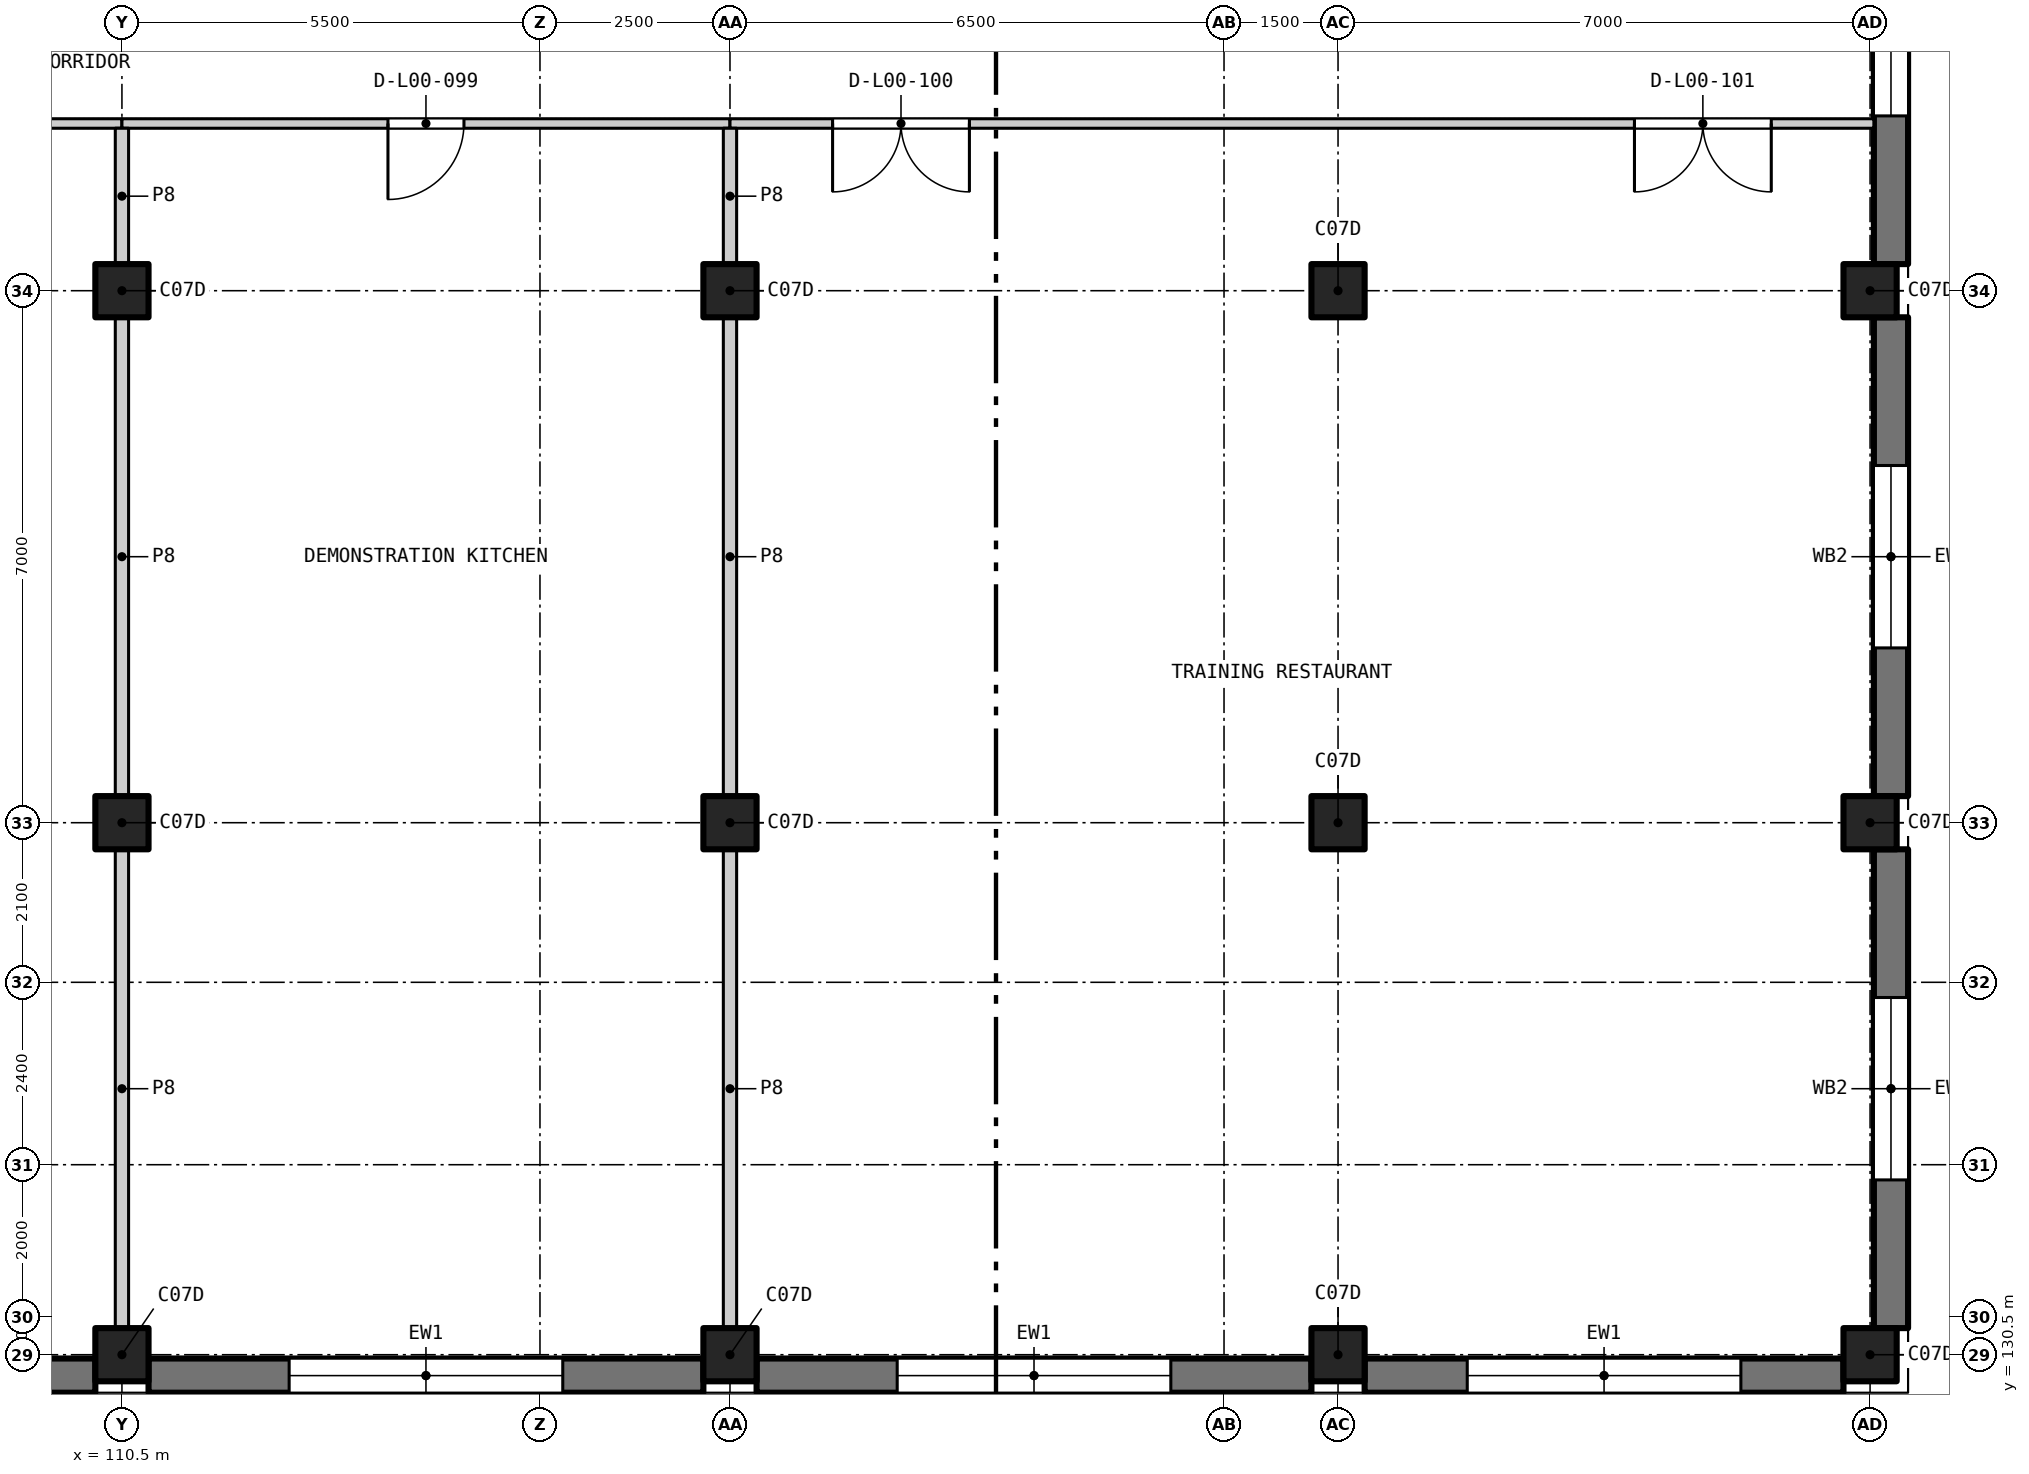
"""IFC4 building model, lengths in metres.
Left out: names, types, materials, properties, quantities, classifications, styles, units other than length and angle.
Written with IfcOpenShell. Run it as: python <this file> out.ifc"""

import sys

from ifc_helpers import new_model, si_unit, direction, frame, frame_2d, origin, origin_2d, place, context, subcontext, project, spatial, rectangle, extrude, element, fill, save


model = new_model("IFC4")
c1 = context("Model", 3, precision=1e-05, world=origin(), true_north=direction((0.0, 1.0)))
c2 = subcontext(c1, "Body", "Model", "MODEL_VIEW")
j1 = project(units=[si_unit("LENGTHUNIT", "METRE"), si_unit("PLANEANGLEUNIT", "RADIAN")], contexts=[c1])
p1 = place(None, origin())
s1 = spatial("IfcSite", under=j1, at=p1, CompositionType="ELEMENT")
p2 = place(p1, origin())
s2 = spatial("IfcBuilding", under=s1, at=p2, CompositionType="ELEMENT")
p3 = place(p2, origin())
s3 = spatial("IfcBuildingStorey", under=s2, at=p3, CompositionType="ELEMENT", Elevation=0.0)
for number, where, z_axis, x_axis in (
    (1, (110.5, 130.5, -1.4), (0.0, 0.0, 1.0), (1.0, 0.0, 0.0)),
    (2, (110.5, 137.5, -1.4), (0.0, 0.0, 1.0), (1.0, 0.0, 0.0)),
    (3, (110.5, 144.5, -1.4), (0.0, 0.0, 1.0), (1.0, 0.0, 0.0)),
    (4, (118.5, 130.5, -1.4), (0.0, 0.0, 1.0), (1.0, 0.0, 0.0)),
    (5, (118.5, 137.5, -1.4), (0.0, 0.0, 1.0), (1.0, 0.0, 0.0)),
    (6, (118.5, 144.5, -1.4), (0.0, 0.0, 1.0), (1.0, 0.0, 0.0)),
    (7, (126.5, 130.5, -1.4), (0.0, 0.0, 1.0), (1.0, 0.0, 0.0)),
    (8, (126.5, 137.5, -1.4), (0.0, 0.0, 1.0), (1.0, 0.0, 0.0)),
    (9, (126.5, 144.5, -1.4), (0.0, 0.0, 1.0), (1.0, 0.0, 0.0)),
    (10, (133.5, 130.5, -1.4), (0.0, 0.0, 1.0), (1.0, 0.0, 0.0)),
    (11, (133.5, 137.5, -1.4), (0.0, 0.0, 1.0), (1.0, 0.0, 0.0)),
    (12, (133.5, 144.5, -1.4), (0.0, 0.0, 1.0), (1.0, 0.0, 0.0)),
):
    element("IfcColumn", number, at=place(p3, frame(where, z_axis=z_axis, x_axis=x_axis)), inside=s3, PredefinedType="COLUMN", context=c2, shape_type="SweptSolid", body=[
        extrude(rectangle(XDim=0.7, YDim=0.7, at=origin_2d()), origin(), (0.0, 0.0, 1.0), 7.4),
    ])
p4 = place(p3, frame((110.15, 130.225, 0.0), z_axis=(0.0, 0.0, 1.0), x_axis=(-1.0, 0.0, 0.0)))
e13 = element("IfcWall", 13, at=p4, inside=s3, PredefinedType="SOLIDWALL", context=c2, shape_type="SweptSolid", body=[
    extrude(rectangle(XDim=7.3, YDim=0.45, at=frame_2d((3.65, 0.0))), origin(), (0.0, 0.0, 1.0), 4.9),
])
p5 = place(p4, frame((1.85, 0.0, 0.9)))
e14 = element("IfcOpeningElement", 14, at=p5, cuts=e13, PredefinedType="OPENING", context=c2, shape_type="SweptSolid", body=[
    extrude(rectangle(XDim=3.6, YDim=1.6, at=frame_2d((1.8, 0.8))), frame((0.0, 0.235, 0.0), z_axis=(0.0, -1.0, 0.0), x_axis=(1.0, 0.0, 0.0)), (0.0, 0.0, 1.0), 0.47),
])
p6 = place(p3, frame((118.15, 130.225, 0.0), z_axis=(0.0, 0.0, 1.0), x_axis=(-1.0, 0.0, 0.0)))
e15 = element("IfcWall", 15, at=p6, inside=s3, PredefinedType="SOLIDWALL", context=c2, shape_type="SweptSolid", body=[
    extrude(rectangle(XDim=7.3, YDim=0.45, at=frame_2d((3.65, 0.0))), origin(), (0.0, 0.0, 1.0), 4.9),
])
p7 = place(p6, frame((1.85, 0.0, 0.9)))
e16 = element("IfcOpeningElement", 16, at=p7, cuts=e15, PredefinedType="OPENING", context=c2, shape_type="SweptSolid", body=[
    extrude(rectangle(XDim=3.6, YDim=1.6, at=frame_2d((1.8, 0.8))), frame((0.0, 0.235, 0.0), z_axis=(0.0, -1.0, 0.0), x_axis=(1.0, 0.0, 0.0)), (0.0, 0.0, 1.0), 0.47),
])
p8 = place(p3, frame((126.15, 130.225, 0.0), z_axis=(0.0, 0.0, 1.0), x_axis=(-1.0, 0.0, 0.0)))
e17 = element("IfcWall", 17, at=p8, inside=s3, PredefinedType="SOLIDWALL", context=c2, shape_type="SweptSolid", body=[
    extrude(rectangle(XDim=7.3, YDim=0.45, at=frame_2d((3.65, 0.0))), origin(), (0.0, 0.0, 1.0), 4.9),
])
p9 = place(p8, frame((1.85, 0.0, 0.9)))
e18 = element("IfcOpeningElement", 18, at=p9, cuts=e17, PredefinedType="OPENING", context=c2, shape_type="SweptSolid", body=[
    extrude(rectangle(XDim=3.6, YDim=1.6, at=frame_2d((1.8, 0.8))), frame((0.0, 0.235, 0.0), z_axis=(0.0, -1.0, 0.0), x_axis=(1.0, 0.0, 0.0)), (0.0, 0.0, 1.0), 0.47),
])
p10 = place(p3, frame((133.15, 130.225, 0.0), z_axis=(0.0, 0.0, 1.0), x_axis=(-1.0, 0.0, 0.0)))
e19 = element("IfcWall", 19, at=p10, inside=s3, PredefinedType="SOLIDWALL", context=c2, shape_type="SweptSolid", body=[
    extrude(rectangle(XDim=6.3, YDim=0.45, at=frame_2d((3.15, 0.0))), origin(), (0.0, 0.0, 1.0), 4.9),
])
p11 = place(p10, frame((1.35, 0.0, 0.9)))
e20 = element("IfcOpeningElement", 20, at=p11, cuts=e19, PredefinedType="OPENING", context=c2, shape_type="SweptSolid", body=[
    extrude(rectangle(XDim=3.6, YDim=1.6, at=frame_2d((1.8, 0.8))), frame((0.0, 0.235, 0.0), z_axis=(0.0, -1.0, 0.0), x_axis=(1.0, 0.0, 0.0)), (0.0, 0.0, 1.0), 0.47),
])
p12 = place(p3, frame((133.775, 137.15, 0.0), z_axis=(0.0, 0.0, 1.0), x_axis=(0.0, -1.0, 0.0)))
e21 = element("IfcWall", 21, at=p12, inside=s3, PredefinedType="SOLIDWALL", context=c2, shape_type="SweptSolid", body=[
    extrude(rectangle(XDim=6.3, YDim=0.45, at=frame_2d((3.15, 0.0))), origin(), (0.0, 0.0, 1.0), 5.0),
])
p13 = place(p12, frame((1.95, 0.0, 0.9)))
e22 = element("IfcOpeningElement", 22, at=p13, cuts=e21, PredefinedType="OPENING", context=c2, shape_type="SweptSolid", body=[
    extrude(rectangle(XDim=2.4, YDim=1.6, at=frame_2d((1.2, 0.8))), frame((0.0, 0.235, 0.0), z_axis=(0.0, -1.0, 0.0), x_axis=(1.0, 0.0, 0.0)), (0.0, 0.0, 1.0), 0.47),
])
p14 = place(p3, frame((133.775, 144.15, 0.0), z_axis=(0.0, 0.0, 1.0), x_axis=(0.0, -1.0, 0.0)))
e23 = element("IfcWall", 23, at=p14, inside=s3, PredefinedType="SOLIDWALL", context=c2, shape_type="SweptSolid", body=[
    extrude(rectangle(XDim=6.3, YDim=0.45, at=frame_2d((3.15, 0.0))), origin(), (0.0, 0.0, 1.0), 5.0),
])
p15 = place(p14, frame((1.95, 0.0, 0.9)))
e24 = element("IfcOpeningElement", 24, at=p15, cuts=e23, PredefinedType="OPENING", context=c2, shape_type="SweptSolid", body=[
    extrude(rectangle(XDim=2.4, YDim=1.6, at=frame_2d((1.2, 0.8))), frame((0.0, 0.235, 0.0), z_axis=(0.0, -1.0, 0.0), x_axis=(1.0, 0.0, 0.0)), (0.0, 0.0, 1.0), 0.47),
])
p16 = place(p3, frame((133.775, 151.15, 0.0), z_axis=(0.0, 0.0, 1.0), x_axis=(0.0, -1.0, 0.0)))
e25 = element("IfcWall", 25, at=p16, inside=s3, PredefinedType="SOLIDWALL", context=c2, shape_type="SweptSolid", body=[
    extrude(rectangle(XDim=6.3, YDim=0.45, at=frame_2d((3.15, 0.0))), origin(), (0.0, 0.0, 1.0), 5.0),
])
p17 = place(p16, frame((1.95, 0.0, 0.9)))
e26 = element("IfcOpeningElement", 26, at=p17, cuts=e25, PredefinedType="OPENING", context=c2, shape_type="SweptSolid", body=[
    extrude(rectangle(XDim=2.4, YDim=1.6, at=frame_2d((1.2, 0.8))), frame((0.0, 0.235, 0.0), z_axis=(0.0, -1.0, 0.0), x_axis=(1.0, 0.0, 0.0)), (0.0, 0.0, 1.0), 0.47),
])
p18 = place(p3, frame((94.5, 146.7, 0.0), z_axis=(0.0, 0.0, 1.0), x_axis=(1.0, 0.0, 0.0)))
e27 = element("IfcWall", 27, at=p18, inside=s3, PredefinedType="PARTITIONING", context=c2, shape_type="SweptSolid", body=[
    extrude(rectangle(XDim=16.0, YDim=0.125, at=frame_2d((8.0, 0.0))), origin(), (0.0, 0.0, 1.0), 5.7),
])
p19 = place(p18, frame((7.1, 0.0, 0.0)))
e28 = element("IfcOpeningElement", 28, at=p19, cuts=e27, PredefinedType="OPENING", context=c2, shape_type="SweptSolid", body=[
    extrude(rectangle(XDim=1.8, YDim=2.1, at=frame_2d((0.9, 1.05))), frame((0.0, 0.073, 0.0), z_axis=(0.0, -1.0, 0.0), x_axis=(1.0, 0.0, 0.0)), (0.0, 0.0, 1.0), 0.145),
])
p20 = place(p18, frame((9.15, 0.0, 0.0)))
e29 = element("IfcOpeningElement", 29, at=p20, cuts=e27, PredefinedType="OPENING", context=c2, shape_type="SweptSolid", body=[
    extrude(rectangle(XDim=1.8, YDim=2.1, at=frame_2d((0.9, 1.05))), frame((0.0, 0.073, 0.0), z_axis=(0.0, -1.0, 0.0), x_axis=(1.0, 0.0, 0.0)), (0.0, 0.0, 1.0), 0.145),
])
p21 = place(p3, frame((110.5, 146.7, 0.0), z_axis=(0.0, 0.0, 1.0), x_axis=(1.0, 0.0, 0.0)))
e30 = element("IfcWall", 30, at=p21, inside=s3, PredefinedType="PARTITIONING", context=c2, shape_type="SweptSolid", body=[
    extrude(rectangle(XDim=8.0, YDim=0.125, at=frame_2d((4.0, 0.0))), origin(), (0.0, 0.0, 1.0), 5.7),
])
p22 = place(p21, frame((3.5, 0.0, 0.0)))
e31 = element("IfcOpeningElement", 31, at=p22, cuts=e30, PredefinedType="OPENING", context=c2, shape_type="SweptSolid", body=[
    extrude(rectangle(XDim=1.0, YDim=2.1, at=frame_2d((0.5, 1.05))), frame((0.0, 0.073, 0.0), z_axis=(0.0, -1.0, 0.0), x_axis=(1.0, 0.0, 0.0)), (0.0, 0.0, 1.0), 0.145),
])
p23 = place(p3, frame((118.5, 146.7, 0.0), z_axis=(0.0, 0.0, 1.0), x_axis=(1.0, 0.0, 0.0)))
e32 = element("IfcWall", 32, at=p23, inside=s3, PredefinedType="PARTITIONING", context=c2, shape_type="SweptSolid", body=[
    extrude(rectangle(XDim=15.05, YDim=0.125, at=frame_2d((7.525, 0.0))), origin(), (0.0, 0.0, 1.0), 5.7),
])
p24 = place(p23, frame((1.35, 0.0, 0.0)))
e33 = element("IfcOpeningElement", 33, at=p24, cuts=e32, PredefinedType="OPENING", context=c2, shape_type="SweptSolid", body=[
    extrude(rectangle(XDim=1.8, YDim=2.1, at=frame_2d((0.9, 1.05))), frame((0.0, 0.073, 0.0), z_axis=(0.0, -1.0, 0.0), x_axis=(1.0, 0.0, 0.0)), (0.0, 0.0, 1.0), 0.145),
])
p25 = place(p23, frame((11.9, 0.0, 0.0)))
e34 = element("IfcOpeningElement", 34, at=p25, cuts=e32, PredefinedType="OPENING", context=c2, shape_type="SweptSolid", body=[
    extrude(rectangle(XDim=1.8, YDim=2.1, at=frame_2d((0.9, 1.05))), frame((0.0, 0.073, 0.0), z_axis=(0.0, -1.0, 0.0), x_axis=(1.0, 0.0, 0.0)), (0.0, 0.0, 1.0), 0.145),
])
for number, where, z_axis, x_axis in (
    (35, (110.5, 130.85, 0.0), (0.0, 0.0, 1.0), (0.0, 1.0, 0.0)),
    (36, (110.5, 137.85, 0.0), (0.0, 0.0, 1.0), (0.0, 1.0, 0.0)),
):
    element("IfcWall", number, at=place(p3, frame(where, z_axis=z_axis, x_axis=x_axis)), inside=s3, PredefinedType="PARTITIONING", context=c2, shape_type="SweptSolid", body=[
        extrude(rectangle(XDim=6.3, YDim=0.175, at=frame_2d((3.15, 0.0))), origin(), (0.0, 0.0, 1.0), 5.0),
    ])
p26 = place(p3, frame((110.5, 144.85, 0.0), z_axis=(0.0, 0.0, 1.0), x_axis=(0.0, 1.0, 0.0)))
e37 = element("IfcWall", 37, at=p26, inside=s3, PredefinedType="PARTITIONING", context=c2, shape_type="SweptSolid", body=[
    extrude(rectangle(XDim=1.787, YDim=0.175, at=frame_2d((0.894, 0.0))), origin(), (0.0, 0.0, 1.0), 5.0),
])
for number, where, z_axis, x_axis in (
    (38, (118.5, 130.85, 0.0), (0.0, 0.0, 1.0), (0.0, 1.0, 0.0)),
    (39, (118.5, 137.85, 0.0), (0.0, 0.0, 1.0), (0.0, 1.0, 0.0)),
):
    element("IfcWall", number, at=place(p3, frame(where, z_axis=z_axis, x_axis=x_axis)), inside=s3, PredefinedType="PARTITIONING", context=c2, shape_type="SweptSolid", body=[
        extrude(rectangle(XDim=6.3, YDim=0.175, at=frame_2d((3.15, 0.0))), origin(), (0.0, 0.0, 1.0), 5.0),
    ])
p27 = place(p3, frame((118.5, 144.85, 0.0), z_axis=(0.0, 0.0, 1.0), x_axis=(0.0, 1.0, 0.0)))
e40 = element("IfcWall", 40, at=p27, inside=s3, PredefinedType="PARTITIONING", context=c2, shape_type="SweptSolid", body=[
    extrude(rectangle(XDim=1.787, YDim=0.175, at=frame_2d((0.894, 0.0))), origin(), (0.0, 0.0, 1.0), 5.0),
])
p28 = place(p7, origin())
e41 = element("IfcWindow", 41, at=p28, inside=s3, PartitioningType="SINGLE_PANEL", PredefinedType="WINDOW", context=c2, shape_type="SweptSolid", body=[
    extrude(rectangle(XDim=3.6, YDim=1.6, at=frame_2d((1.8, 0.8))), frame((0.0, -0.125, 0.0), z_axis=(0.0, -1.0, 0.0), x_axis=(1.0, 0.0, 0.0)), (0.0, 0.0, 1.0), 0.06),
])
fill(e16, e41)
p29 = place(p9, origin())
e42 = element("IfcWindow", 42, at=p29, inside=s3, PartitioningType="SINGLE_PANEL", PredefinedType="WINDOW", context=c2, shape_type="SweptSolid", body=[
    extrude(rectangle(XDim=3.6, YDim=1.6, at=frame_2d((1.8, 0.8))), frame((0.0, -0.125, 0.0), z_axis=(0.0, -1.0, 0.0), x_axis=(1.0, 0.0, 0.0)), (0.0, 0.0, 1.0), 0.06),
])
fill(e18, e42)
p30 = place(p11, origin())
e43 = element("IfcWindow", 43, at=p30, inside=s3, PartitioningType="SINGLE_PANEL", PredefinedType="WINDOW", context=c2, shape_type="SweptSolid", body=[
    extrude(rectangle(XDim=3.6, YDim=1.6, at=frame_2d((1.8, 0.8))), frame((0.0, -0.125, 0.0), z_axis=(0.0, -1.0, 0.0), x_axis=(1.0, 0.0, 0.0)), (0.0, 0.0, 1.0), 0.06),
])
fill(e20, e43)
p31 = place(p13, origin())
e44 = element("IfcWindow", 44, at=p31, inside=s3, PartitioningType="SINGLE_PANEL", PredefinedType="WINDOW", context=c2, shape_type="SweptSolid", body=[
    extrude(rectangle(XDim=2.4, YDim=1.6, at=frame_2d((1.2, 0.8))), frame((0.0, -0.125, 0.0), z_axis=(0.0, -1.0, 0.0), x_axis=(1.0, 0.0, 0.0)), (0.0, 0.0, 1.0), 0.06),
])
fill(e22, e44)
p32 = place(p15, origin())
e45 = element("IfcWindow", 45, at=p32, inside=s3, PartitioningType="SINGLE_PANEL", PredefinedType="WINDOW", context=c2, shape_type="SweptSolid", body=[
    extrude(rectangle(XDim=2.4, YDim=1.6, at=frame_2d((1.2, 0.8))), frame((0.0, -0.125, 0.0), z_axis=(0.0, -1.0, 0.0), x_axis=(1.0, 0.0, 0.0)), (0.0, 0.0, 1.0), 0.06),
])
fill(e24, e45)
p33 = place(p17, origin())
e46 = element("IfcWindow", 46, at=p33, inside=s3, PartitioningType="SINGLE_PANEL", PredefinedType="WINDOW", context=c2, shape_type="SweptSolid", body=[
    extrude(rectangle(XDim=2.4, YDim=1.6, at=frame_2d((1.2, 0.8))), frame((0.0, -0.125, 0.0), z_axis=(0.0, -1.0, 0.0), x_axis=(1.0, 0.0, 0.0)), (0.0, 0.0, 1.0), 0.06),
])
fill(e26, e46)
p34 = place(p22, frame((1.0, 0.0, 0.0), z_axis=(0.0, 0.0, 1.0), x_axis=(-1.0, 0.0, 0.0)))
e47 = element("IfcDoor", 47, at=p34, inside=s3, OperationType="SINGLE_SWING_RIGHT", PredefinedType="DOOR", context=c2, shape_type="SweptSolid", body=[
    extrude(rectangle(XDim=1.0, YDim=2.1, at=frame_2d((0.5, 1.05))), frame((0.0, 0.025, 0.0), z_axis=(0.0, -1.0, 0.0), x_axis=(1.0, 0.0, 0.0)), (0.0, 0.0, 1.0), 0.05),
])
fill(e31, e47)
p35 = place(p24, frame((1.8, 0.0, 0.0), z_axis=(0.0, 0.0, 1.0), x_axis=(-1.0, 0.0, 0.0)))
e48 = element("IfcDoor", 48, at=p35, inside=s3, OperationType="DOUBLE_DOOR_SINGLE_SWING", PredefinedType="DOOR", context=c2, shape_type="SweptSolid", body=[
    extrude(rectangle(XDim=1.8, YDim=2.1, at=frame_2d((0.9, 1.05))), frame((0.0, 0.025, 0.0), z_axis=(0.0, -1.0, 0.0), x_axis=(1.0, 0.0, 0.0)), (0.0, 0.0, 1.0), 0.05),
])
fill(e33, e48)
p36 = place(p25, frame((1.8, 0.0, 0.0), z_axis=(0.0, 0.0, 1.0), x_axis=(-1.0, 0.0, 0.0)))
e49 = element("IfcDoor", 49, at=p36, inside=s3, OperationType="DOUBLE_DOOR_SINGLE_SWING", PredefinedType="DOOR", context=c2, shape_type="SweptSolid", body=[
    extrude(rectangle(XDim=1.8, YDim=2.1, at=frame_2d((0.9, 1.05))), frame((0.0, 0.025, 0.0), z_axis=(0.0, -1.0, 0.0), x_axis=(1.0, 0.0, 0.0)), (0.0, 0.0, 1.0), 0.05),
])
fill(e34, e49)
save(model, sys.argv[1])
